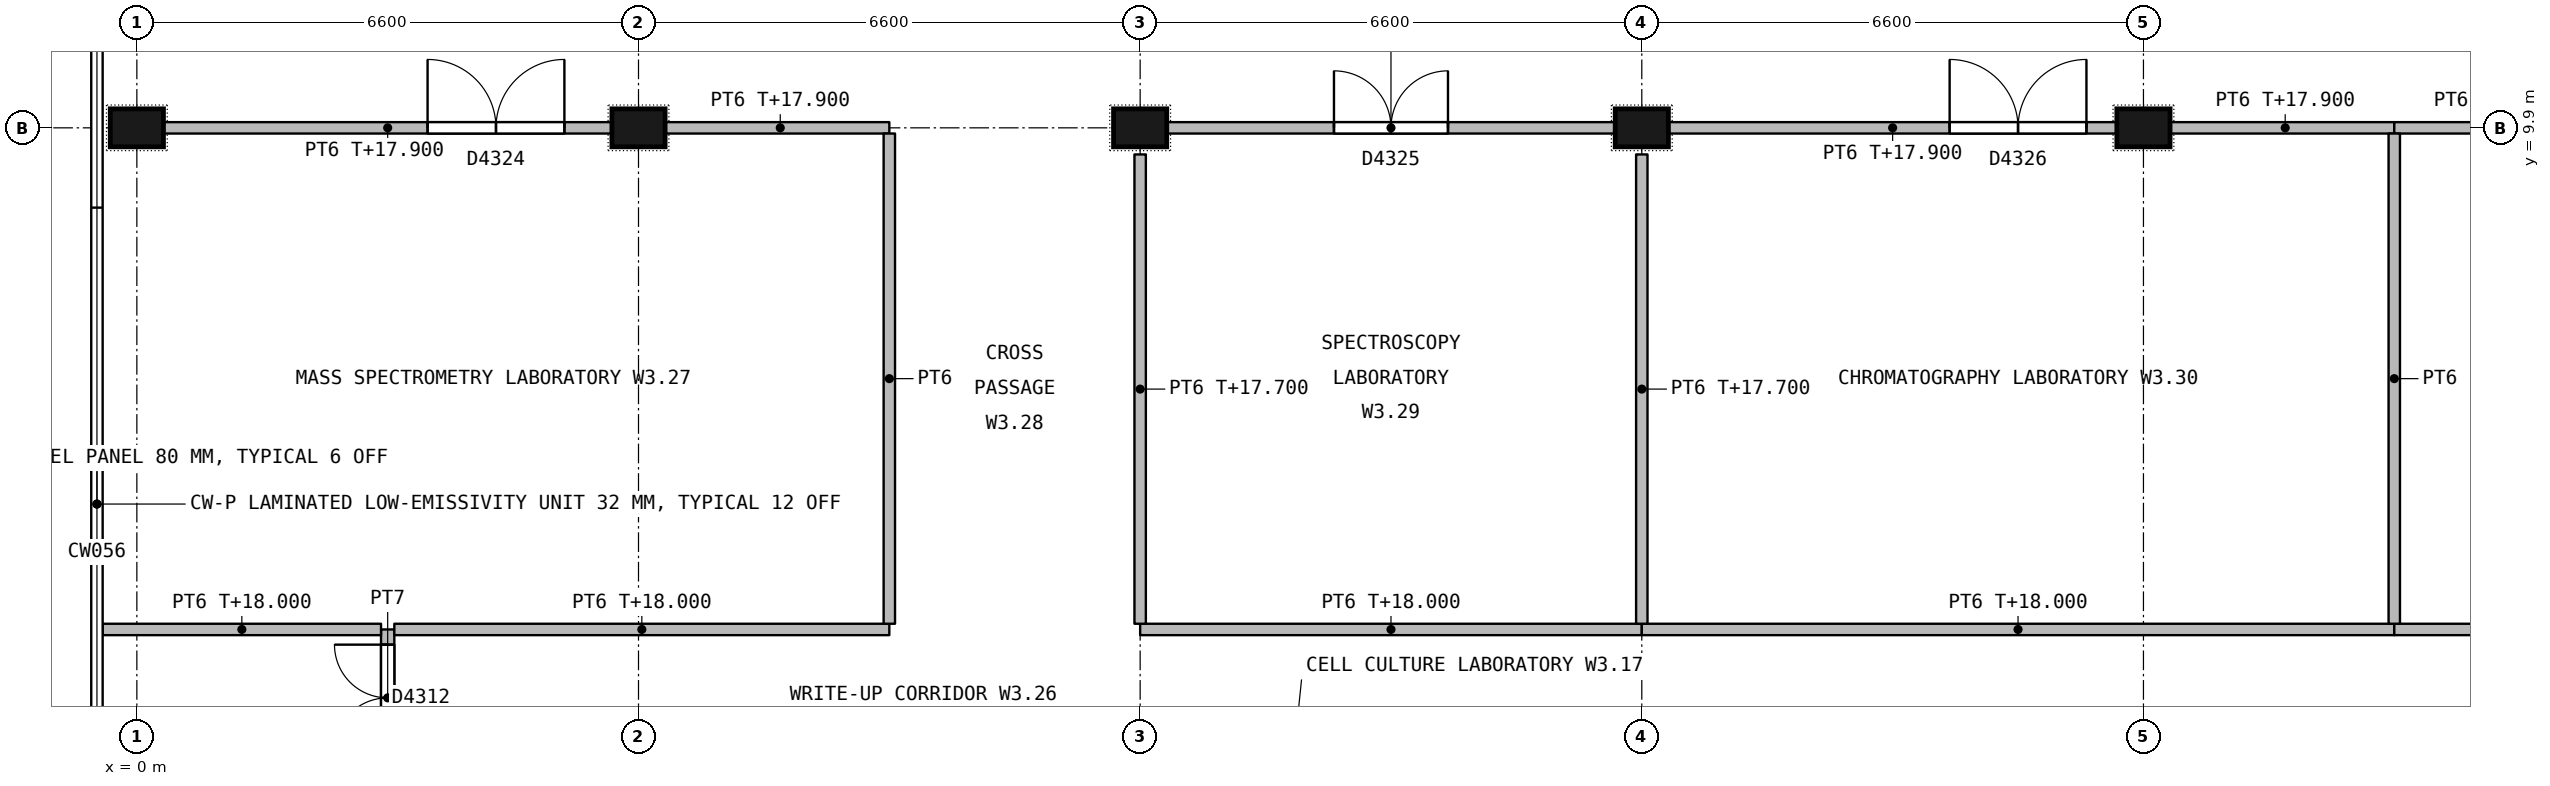
"""IFC4 building model, lengths in metres.
Left out: names, types, materials, properties, quantities, classifications, styles, units other than length and angle.
Written with IfcOpenShell. Run it as: python <this file> out.ifc"""

import sys

from ifc_helpers import new_model, si_unit, direction, frame, frame_2d, origin, origin_2d, place, context, subcontext, project, spatial, rectangle, extrude, element, fill, save


model = new_model("IFC4")
c1 = context("Model", 3, precision=1e-05, world=origin(), true_north=direction((0.0, 1.0)))
c2 = subcontext(c1, "Body", "Model", "MODEL_VIEW")
j1 = project(units=[si_unit("LENGTHUNIT", "METRE"), si_unit("PLANEANGLEUNIT", "RADIAN")], contexts=[c1])
p1 = place(None, origin())
s1 = spatial("IfcSite", under=j1, at=p1, CompositionType="ELEMENT")
p2 = place(p1, origin())
s2 = spatial("IfcBuilding", under=s1, at=p2, CompositionType="ELEMENT")
p3 = place(p2, frame((0.0, 0.0, 14.4)))
s3 = spatial("IfcBuildingStorey", under=s2, at=p3, CompositionType="ELEMENT", Elevation=14.4)
for number, where, z_axis, x_axis in (
    (1, (0.0, 9.9, 0.0), (0.0, 0.0, 1.0), (1.0, 0.0, 0.0)),
    (2, (6.6, 9.9, 0.0), (0.0, 0.0, 1.0), (1.0, 0.0, 0.0)),
    (3, (13.2, 9.9, 0.0), (0.0, 0.0, 1.0), (1.0, 0.0, 0.0)),
    (4, (19.8, 9.9, 0.0), (0.0, 0.0, 1.0), (1.0, 0.0, 0.0)),
    (5, (26.4, 9.9, 0.0), (0.0, 0.0, 1.0), (1.0, 0.0, 0.0)),
):
    element("IfcColumn", number, at=place(p3, frame(where, z_axis=z_axis, x_axis=x_axis)), inside=s3, PredefinedType="COLUMN", context=c2, shape_type="SweptSolid", body=[
        extrude(rectangle(XDim=0.7, YDim=0.5, at=origin_2d()), origin(), (0.0, 0.0, 1.0), 4.5),
    ])
p4 = place(p3, frame((0.35, 9.9, 0.0), z_axis=(0.0, 0.0, 1.0), x_axis=(1.0, 0.0, 0.0)))
e6 = element("IfcWall", 6, at=p4, inside=s3, PredefinedType="PARTITIONING", context=c2, shape_type="SweptSolid", body=[
    extrude(rectangle(XDim=5.9, YDim=0.15, at=frame_2d((2.95, 0.0))), origin(), (0.0, 0.0, 1.0), 3.5),
])
p5 = place(p4, frame((3.475, 0.0, 0.0)))
e7 = element("IfcOpeningElement", 7, at=p5, cuts=e6, PredefinedType="OPENING", context=c2, shape_type="SweptSolid", body=[
    extrude(rectangle(XDim=1.8, YDim=2.4, at=frame_2d((0.9, 1.2))), frame((0.0, 0.085, 0.0), z_axis=(0.0, -1.0, 0.0), x_axis=(1.0, 0.0, 0.0)), (0.0, 0.0, 1.0), 0.17),
])
p6 = place(p3, frame((6.95, 9.9, 0.0), z_axis=(0.0, 0.0, 1.0), x_axis=(1.0, 0.0, 0.0)))
e8 = element("IfcWall", 8, at=p6, inside=s3, PredefinedType="PARTITIONING", context=c2, shape_type="SweptSolid", body=[
    extrude(rectangle(XDim=2.95, YDim=0.15, at=frame_2d((1.475, 0.0))), origin(), (0.0, 0.0, 1.0), 3.5),
])
p7 = place(p3, frame((13.55, 9.9, 0.0), z_axis=(0.0, 0.0, 1.0), x_axis=(1.0, 0.0, 0.0)))
e9 = element("IfcWall", 9, at=p7, inside=s3, PredefinedType="PARTITIONING", context=c2, shape_type="SweptSolid", body=[
    extrude(rectangle(XDim=5.9, YDim=0.15, at=frame_2d((2.95, 0.0))), origin(), (0.0, 0.0, 1.0), 3.5),
])
p8 = place(p7, frame((2.2, 0.0, 0.0)))
e10 = element("IfcOpeningElement", 10, at=p8, cuts=e9, PredefinedType="OPENING", context=c2, shape_type="SweptSolid", body=[
    extrude(rectangle(XDim=1.5, YDim=2.1, at=frame_2d((0.75, 1.05))), frame((0.0, 0.085, 0.0), z_axis=(0.0, -1.0, 0.0), x_axis=(1.0, 0.0, 0.0)), (0.0, 0.0, 1.0), 0.17),
])
p9 = place(p3, frame((20.15, 9.9, 0.0), z_axis=(0.0, 0.0, 1.0), x_axis=(1.0, 0.0, 0.0)))
e11 = element("IfcWall", 11, at=p9, inside=s3, PredefinedType="PARTITIONING", context=c2, shape_type="SweptSolid", body=[
    extrude(rectangle(XDim=5.9, YDim=0.15, at=frame_2d((2.95, 0.0))), origin(), (0.0, 0.0, 1.0), 3.5),
])
p10 = place(p9, frame((3.7, 0.0, 0.0)))
e12 = element("IfcOpeningElement", 12, at=p10, cuts=e11, PredefinedType="OPENING", context=c2, shape_type="SweptSolid", body=[
    extrude(rectangle(XDim=1.8, YDim=2.4, at=frame_2d((0.9, 1.2))), frame((0.0, 0.085, 0.0), z_axis=(0.0, -1.0, 0.0), x_axis=(1.0, 0.0, 0.0)), (0.0, 0.0, 1.0), 0.17),
])
for number, where, z_axis, x_axis in (
    (13, (26.75, 9.9, 0.0), (0.0, 0.0, 1.0), (1.0, 0.0, 0.0)),
    (14, (29.7, 9.9, 0.0), (0.0, 0.0, 1.0), (1.0, 0.0, 0.0)),
):
    element("IfcWall", number, at=place(p3, frame(where, z_axis=z_axis, x_axis=x_axis)), inside=s3, PredefinedType="PARTITIONING", context=c2, shape_type="SweptSolid", body=[
        extrude(rectangle(XDim=2.95, YDim=0.15, at=frame_2d((1.475, 0.0))), origin(), (0.0, 0.0, 1.0), 3.5),
    ])
p11 = place(p3, frame((3.3, 1.5, 0.0), z_axis=(0.0, 0.0, 1.0), x_axis=(0.0, 1.0, 0.0)))
e15 = element("IfcWall", 15, at=p11, inside=s3, PredefinedType="PARTITIONING", context=c2, shape_type="SweptSolid", body=[
    extrude(rectangle(XDim=1.8, YDim=0.175, at=frame_2d((0.9, 0.0))), origin(), (0.0, 0.0, 1.0), 4.2),
])
p12 = place(p11, frame((0.2, 0.0, 0.0)))
e16 = element("IfcOpeningElement", 16, at=p12, cuts=e15, PredefinedType="OPENING", context=c2, shape_type="SweptSolid", body=[
    extrude(rectangle(XDim=1.4, YDim=2.1, at=frame_2d((0.7, 1.05))), frame((0.0, 0.097, 0.0), z_axis=(0.0, -1.0, 0.0), x_axis=(1.0, 0.0, 0.0)), (0.0, 0.0, 1.0), 0.195),
])
p13 = place(p3, frame((3.212, 3.3, 0.0), z_axis=(0.0, 0.0, 1.0), x_axis=(-1.0, 0.0, 0.0)))
e17 = element("IfcWall", 17, at=p13, inside=s3, PredefinedType="PARTITIONING", context=c2, shape_type="SweptSolid", body=[
    extrude(rectangle(XDim=3.662, YDim=0.15, at=frame_2d((1.831, 0.0))), origin(), (0.0, 0.0, 1.0), 3.6),
])
p14 = place(p3, frame((9.9, 3.3, 0.0), z_axis=(0.0, 0.0, 1.0), x_axis=(-1.0, 0.0, 0.0)))
e18 = element("IfcWall", 18, at=p14, inside=s3, PredefinedType="PARTITIONING", context=c2, shape_type="SweptSolid", body=[
    extrude(rectangle(XDim=6.512, YDim=0.15, at=frame_2d((3.256, 0.0))), origin(), (0.0, 0.0, 1.0), 3.6),
])
p15 = place(p3, frame((19.8, 3.3, 0.0), z_axis=(0.0, 0.0, 1.0), x_axis=(-1.0, 0.0, 0.0)))
e19 = element("IfcWall", 19, at=p15, inside=s3, PredefinedType="PARTITIONING", context=c2, shape_type="SweptSolid", body=[
    extrude(rectangle(XDim=6.6, YDim=0.15, at=frame_2d((3.3, 0.0))), origin(), (0.0, 0.0, 1.0), 3.6),
])
p16 = place(p3, frame((29.7, 3.3, 0.0), z_axis=(0.0, 0.0, 1.0), x_axis=(-1.0, 0.0, 0.0)))
e20 = element("IfcWall", 20, at=p16, inside=s3, PredefinedType="PARTITIONING", context=c2, shape_type="SweptSolid", body=[
    extrude(rectangle(XDim=9.9, YDim=0.15, at=frame_2d((4.95, 0.0))), origin(), (0.0, 0.0, 1.0), 3.6),
])
p17 = place(p3, frame((39.6, 3.3, 0.0), z_axis=(0.0, 0.0, 1.0), x_axis=(-1.0, 0.0, 0.0)))
e21 = element("IfcWall", 21, at=p17, inside=s3, PredefinedType="PARTITIONING", context=c2, shape_type="SweptSolid", body=[
    extrude(rectangle(XDim=9.9, YDim=0.15, at=frame_2d((4.95, 0.0))), origin(), (0.0, 0.0, 1.0), 3.6),
])
p18 = place(p3, frame((9.9, 3.375, 0.0), z_axis=(0.0, 0.0, 1.0), x_axis=(0.0, 1.0, 0.0)))
e22 = element("IfcWall", 22, at=p18, inside=s3, PredefinedType="PARTITIONING", context=c2, shape_type="SweptSolid", body=[
    extrude(rectangle(XDim=6.45, YDim=0.15, at=frame_2d((3.225, 0.0))), origin(), (0.0, 0.0, 1.0), 4.2),
])
for number, where, z_axis, x_axis in (
    (23, (13.2, 3.375, 0.0), (0.0, 0.0, 1.0), (0.0, 1.0, 0.0)),
    (24, (19.8, 3.375, 0.0), (0.0, 0.0, 1.0), (0.0, 1.0, 0.0)),
):
    element("IfcWall", number, at=place(p3, frame(where, z_axis=z_axis, x_axis=x_axis)), inside=s3, PredefinedType="PARTITIONING", context=c2, shape_type="SweptSolid", body=[
        extrude(rectangle(XDim=6.175, YDim=0.15, at=frame_2d((3.087, 0.0))), origin(), (0.0, 0.0, 1.0), 3.3),
    ])
p19 = place(p3, frame((29.7, 3.375, 0.0), z_axis=(0.0, 0.0, 1.0), x_axis=(0.0, 1.0, 0.0)))
e25 = element("IfcWall", 25, at=p19, inside=s3, PredefinedType="PARTITIONING", context=c2, shape_type="SweptSolid", body=[
    extrude(rectangle(XDim=6.45, YDim=0.15, at=frame_2d((3.225, 0.0))), origin(), (0.0, 0.0, 1.0), 4.2),
])
p20 = place(p12, origin())
e26 = element("IfcDoor", 26, at=p20, inside=s3, OperationType="DOUBLE_DOOR_SINGLE_SWING", PredefinedType="DOOR", context=c2, shape_type="SweptSolid", body=[
    extrude(rectangle(XDim=1.4, YDim=2.1, at=frame_2d((0.7, 1.05))), frame((0.0, 0.027, 0.0), z_axis=(0.0, -1.0, 0.0), x_axis=(1.0, 0.0, 0.0)), (0.0, 0.0, 1.0), 0.054),
])
fill(e16, e26)
p21 = place(p5, origin())
e27 = element("IfcDoor", 27, at=p21, inside=s3, OperationType="DOUBLE_DOOR_SINGLE_SWING", PredefinedType="DOOR", context=c2, shape_type="SweptSolid", body=[
    extrude(rectangle(XDim=1.8, YDim=2.4, at=frame_2d((0.9, 1.2))), frame((0.0, 0.027, 0.0), z_axis=(0.0, -1.0, 0.0), x_axis=(1.0, 0.0, 0.0)), (0.0, 0.0, 1.0), 0.054),
])
fill(e7, e27)
p22 = place(p8, origin())
e28 = element("IfcDoor", 28, at=p22, inside=s3, OperationType="DOUBLE_DOOR_SINGLE_SWING", PredefinedType="DOOR", context=c2, shape_type="SweptSolid", body=[
    extrude(rectangle(XDim=1.5, YDim=2.1, at=frame_2d((0.75, 1.05))), frame((0.0, 0.027, 0.0), z_axis=(0.0, -1.0, 0.0), x_axis=(1.0, 0.0, 0.0)), (0.0, 0.0, 1.0), 0.054),
])
fill(e10, e28)
p23 = place(p10, origin())
e29 = element("IfcDoor", 29, at=p23, inside=s3, OperationType="DOUBLE_DOOR_SINGLE_SWING", PredefinedType="DOOR", context=c2, shape_type="SweptSolid", body=[
    extrude(rectangle(XDim=1.8, YDim=2.4, at=frame_2d((0.9, 1.2))), frame((0.0, 0.027, 0.0), z_axis=(0.0, -1.0, 0.0), x_axis=(1.0, 0.0, 0.0)), (0.0, 0.0, 1.0), 0.054),
])
fill(e12, e29)
save(model, sys.argv[1])
